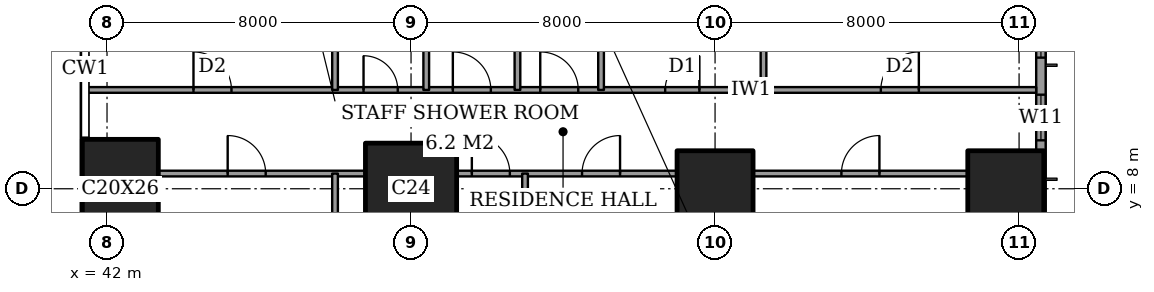
"""IFC4 building model, lengths in metres.
Left out: names, types, materials, properties, quantities, classifications, styles, units other than length and angle.
Written with IfcOpenShell. Run it as: python <this file> out.ifc"""

import sys

from ifc_helpers import new_model, si_unit, direction, frame, frame_2d, origin, origin_2d, place, context, subcontext, project, spatial, rectangle, extrude, element, fill, save


model = new_model("IFC4")
c1 = context("Model", 3, precision=1e-05, world=origin(), true_north=direction((0.0, 1.0)))
c2 = subcontext(c1, "Body", "Model", "MODEL_VIEW")
j1 = project(units=[si_unit("LENGTHUNIT", "METRE"), si_unit("PLANEANGLEUNIT", "RADIAN")], contexts=[c1])
p1 = place(None, origin())
s1 = spatial("IfcSite", under=j1, at=p1, CompositionType="ELEMENT")
p2 = place(p1, origin())
s2 = spatial("IfcBuilding", under=s1, at=p2, CompositionType="ELEMENT")
p3 = place(p2, frame((0.0, 0.0, 139.4)))
s3 = spatial("IfcBuildingStorey", under=s2, at=p3, CompositionType="ELEMENT", Elevation=139.4)
p4 = place(p3, frame((42.35, 8.0, 0.0), z_axis=(0.0, 0.0, 1.0), x_axis=(1.0, 0.0, 0.0)))
e1 = element("IfcColumn", 1, at=p4, inside=s3, PredefinedType="COLUMN", context=c2, shape_type="SweptSolid", body=[
    extrude(rectangle(XDim=2.0, YDim=2.6, at=origin_2d()), origin(), (0.0, 0.0, 1.0), 3.6),
])
p5 = place(p3, frame((50.0, 8.0, 0.0), z_axis=(0.0, 0.0, 1.0), x_axis=(1.0, 0.0, 0.0)))
e2 = element("IfcColumn", 2, at=p5, inside=s3, PredefinedType="COLUMN", context=c2, shape_type="SweptSolid", body=[
    extrude(rectangle(XDim=2.4, YDim=2.4, at=origin_2d()), origin(), (0.0, 0.0, 1.0), 3.6),
])
for number, where, z_axis, x_axis in (
    (3, (58.0, 8.0, 0.0), (0.0, 0.0, 1.0), (1.0, 0.0, 0.0)),
    (4, (65.65, 8.0, 0.0), (0.0, 0.0, 1.0), (1.0, 0.0, 0.0)),
):
    element("IfcColumn", number, at=place(p3, frame(where, z_axis=z_axis, x_axis=x_axis)), inside=s3, PredefinedType="COLUMN", context=c2, shape_type="SweptSolid", body=[
        extrude(rectangle(XDim=2.0, YDim=2.0, at=origin_2d()), origin(), (0.0, 0.0, 1.0), 3.6),
    ])
p6 = place(p3, frame((66.575, 3.175, 0.0), z_axis=(0.0, 0.0, 1.0), x_axis=(0.0, 1.0, 0.0)))
e5 = element("IfcWall", 5, at=p6, inside=s3, PredefinedType="SOLIDWALL", context=c2, shape_type="SweptSolid", body=[
    extrude(rectangle(XDim=41.65, YDim=0.25, at=frame_2d((20.825, 0.0))), origin(), (0.0, 0.0, 1.0), 3.6),
])
p7 = place(p6, frame((0.775, 0.0, 0.4)))
e6 = element("IfcOpeningElement", 6, at=p7, cuts=e5, PredefinedType="OPENING", context=c2, shape_type="SweptSolid", body=[
    extrude(rectangle(XDim=2.4, YDim=2.2, at=frame_2d((1.2, 1.1))), frame((0.0, 0.135, 0.0), z_axis=(0.0, -1.0, 0.0), x_axis=(1.0, 0.0, 0.0)), (0.0, 0.0, 1.0), 0.27),
])
p8 = place(p6, frame((6.1, 0.0, 0.4)))
e7 = element("IfcOpeningElement", 7, at=p8, cuts=e5, PredefinedType="OPENING", context=c2, shape_type="SweptSolid", body=[
    extrude(rectangle(XDim=1.2, YDim=2.2, at=frame_2d((0.6, 1.1))), frame((0.0, 0.135, 0.0), z_axis=(0.0, -1.0, 0.0), x_axis=(1.0, 0.0, 0.0)), (0.0, 0.0, 1.0), 0.27),
])
p9 = place(p6, frame((8.275, 0.0, 0.4)))
e8 = element("IfcOpeningElement", 8, at=p9, cuts=e5, PredefinedType="OPENING", context=c2, shape_type="SweptSolid", body=[
    extrude(rectangle(XDim=2.4, YDim=2.2, at=frame_2d((1.2, 1.1))), frame((0.0, 0.135, 0.0), z_axis=(0.0, -1.0, 0.0), x_axis=(1.0, 0.0, 0.0)), (0.0, 0.0, 1.0), 0.27),
])
p10 = place(p6, frame((15.775, 0.0, 0.4)))
e9 = element("IfcOpeningElement", 9, at=p10, cuts=e5, PredefinedType="OPENING", context=c2, shape_type="SweptSolid", body=[
    extrude(rectangle(XDim=2.4, YDim=2.2, at=frame_2d((1.2, 1.1))), frame((0.0, 0.135, 0.0), z_axis=(0.0, -1.0, 0.0), x_axis=(1.0, 0.0, 0.0)), (0.0, 0.0, 1.0), 0.27),
])
p11 = place(p6, frame((23.475, 0.0, 0.4)))
e10 = element("IfcOpeningElement", 10, at=p11, cuts=e5, PredefinedType="OPENING", context=c2, shape_type="SweptSolid", body=[
    extrude(rectangle(XDim=2.4, YDim=2.2, at=frame_2d((1.2, 1.1))), frame((0.0, 0.135, 0.0), z_axis=(0.0, -1.0, 0.0), x_axis=(1.0, 0.0, 0.0)), (0.0, 0.0, 1.0), 0.27),
])
p12 = place(p6, frame((30.975, 0.0, 0.4)))
e11 = element("IfcOpeningElement", 11, at=p12, cuts=e5, PredefinedType="OPENING", context=c2, shape_type="SweptSolid", body=[
    extrude(rectangle(XDim=2.4, YDim=2.2, at=frame_2d((1.2, 1.1))), frame((0.0, 0.135, 0.0), z_axis=(0.0, -1.0, 0.0), x_axis=(1.0, 0.0, 0.0)), (0.0, 0.0, 1.0), 0.27),
])
p13 = place(p6, frame((34.5, 0.0, 0.4)))
e12 = element("IfcOpeningElement", 12, at=p13, cuts=e5, PredefinedType="OPENING", context=c2, shape_type="SweptSolid", body=[
    extrude(rectangle(XDim=1.2, YDim=2.2, at=frame_2d((0.6, 1.1))), frame((0.0, 0.135, 0.0), z_axis=(0.0, -1.0, 0.0), x_axis=(1.0, 0.0, 0.0)), (0.0, 0.0, 1.0), 0.27),
])
p14 = place(p6, frame((38.475, 0.0, 0.4)))
e13 = element("IfcOpeningElement", 13, at=p14, cuts=e5, PredefinedType="OPENING", context=c2, shape_type="SweptSolid", body=[
    extrude(rectangle(XDim=2.4, YDim=2.2, at=frame_2d((1.2, 1.1))), frame((0.0, 0.135, 0.0), z_axis=(0.0, -1.0, 0.0), x_axis=(1.0, 0.0, 0.0)), (0.0, 0.0, 1.0), 0.27),
])
p15 = place(p3, frame((43.35, 8.4, 0.0), z_axis=(0.0, 0.0, 1.0), x_axis=(1.0, 0.0, 0.0)))
e14 = element("IfcWall", 14, at=p15, inside=s3, PredefinedType="PARTITIONING", context=c2, shape_type="SweptSolid", body=[
    extrude(rectangle(XDim=5.45, YDim=0.15, at=frame_2d((2.725, 0.0))), origin(), (0.0, 0.0, 1.0), 3.35),
])
p16 = place(p15, frame((1.825, 0.0, 0.0)))
e15 = element("IfcOpeningElement", 15, at=p16, cuts=e14, PredefinedType="OPENING", context=c2, shape_type="SweptSolid", body=[
    extrude(rectangle(XDim=1.0, YDim=2.1, at=frame_2d((0.5, 1.05))), frame((0.0, 0.085, 0.0), z_axis=(0.0, -1.0, 0.0), x_axis=(1.0, 0.0, 0.0)), (0.0, 0.0, 1.0), 0.17),
])
p17 = place(p3, frame((51.2, 8.4, 0.0), z_axis=(0.0, 0.0, 1.0), x_axis=(1.0, 0.0, 0.0)))
e16 = element("IfcWall", 16, at=p17, inside=s3, PredefinedType="PARTITIONING", context=c2, shape_type="SweptSolid", body=[
    extrude(rectangle(XDim=5.8, YDim=0.15, at=frame_2d((2.9, 0.0))), origin(), (0.0, 0.0, 1.0), 3.35),
])
p18 = place(p17, frame((3.3, 0.0, 0.0)))
e17 = element("IfcOpeningElement", 17, at=p18, cuts=e16, PredefinedType="OPENING", context=c2, shape_type="SweptSolid", body=[
    extrude(rectangle(XDim=1.0, YDim=2.1, at=frame_2d((0.5, 1.05))), frame((0.0, 0.085, 0.0), z_axis=(0.0, -1.0, 0.0), x_axis=(1.0, 0.0, 0.0)), (0.0, 0.0, 1.0), 0.17),
])
p19 = place(p17, frame((0.4, 0.0, 0.0)))
e18 = element("IfcOpeningElement", 18, at=p19, cuts=e16, PredefinedType="OPENING", context=c2, shape_type="SweptSolid", body=[
    extrude(rectangle(XDim=1.0, YDim=2.1, at=frame_2d((0.5, 1.05))), frame((0.0, 0.085, 0.0), z_axis=(0.0, -1.0, 0.0), x_axis=(1.0, 0.0, 0.0)), (0.0, 0.0, 1.0), 0.17),
])
p20 = place(p3, frame((59.0, 8.4, 0.0), z_axis=(0.0, 0.0, 1.0), x_axis=(1.0, 0.0, 0.0)))
e19 = element("IfcWall", 19, at=p20, inside=s3, PredefinedType="PARTITIONING", context=c2, shape_type="SweptSolid", body=[
    extrude(rectangle(XDim=5.65, YDim=0.15, at=frame_2d((2.825, 0.0))), origin(), (0.0, 0.0, 1.0), 3.35),
])
p21 = place(p20, frame((2.325, 0.0, 0.0)))
e20 = element("IfcOpeningElement", 20, at=p21, cuts=e19, PredefinedType="OPENING", context=c2, shape_type="SweptSolid", body=[
    extrude(rectangle(XDim=1.0, YDim=2.1, at=frame_2d((0.5, 1.05))), frame((0.0, 0.085, 0.0), z_axis=(0.0, -1.0, 0.0), x_axis=(1.0, 0.0, 0.0)), (0.0, 0.0, 1.0), 0.17),
])
p22 = place(p3, frame((41.439, 10.6, 0.0), z_axis=(0.0, 0.0, 1.0), x_axis=(1.0, 0.0, 0.0)))
e21 = element("IfcWall", 21, at=p22, inside=s3, PredefinedType="PARTITIONING", context=c2, shape_type="SweptSolid", body=[
    extrude(rectangle(XDim=25.011, YDim=0.15, at=frame_2d((12.505, 0.0))), origin(), (0.0, 0.0, 1.0), 3.35),
])
p23 = place(p22, frame((11.961, 0.0, 0.0)))
e22 = element("IfcOpeningElement", 22, at=p23, cuts=e21, PredefinedType="OPENING", context=c2, shape_type="SweptSolid", body=[
    extrude(rectangle(XDim=1.0, YDim=2.1, at=frame_2d((0.5, 1.05))), frame((0.0, 0.085, 0.0), z_axis=(0.0, -1.0, 0.0), x_axis=(1.0, 0.0, 0.0)), (0.0, 0.0, 1.0), 0.17),
])
p24 = place(p22, frame((20.924, 0.0, 0.0)))
e23 = element("IfcOpeningElement", 23, at=p24, cuts=e21, PredefinedType="OPENING", context=c2, shape_type="SweptSolid", body=[
    extrude(rectangle(XDim=1.0, YDim=2.1, at=frame_2d((0.5, 1.05))), frame((0.0, 0.085, 0.0), z_axis=(0.0, -1.0, 0.0), x_axis=(1.0, 0.0, 0.0)), (0.0, 0.0, 1.0), 0.17),
])
p25 = place(p22, frame((15.249, 0.0, 0.0)))
e24 = element("IfcOpeningElement", 24, at=p25, cuts=e21, PredefinedType="OPENING", context=c2, shape_type="SweptSolid", body=[
    extrude(rectangle(XDim=0.9, YDim=2.1, at=frame_2d((0.45, 1.05))), frame((0.0, 0.085, 0.0), z_axis=(0.0, -1.0, 0.0), x_axis=(1.0, 0.0, 0.0)), (0.0, 0.0, 1.0), 0.17),
])
p26 = place(p22, frame((9.661, 0.0, 0.0)))
e25 = element("IfcOpeningElement", 25, at=p26, cuts=e21, PredefinedType="OPENING", context=c2, shape_type="SweptSolid", body=[
    extrude(rectangle(XDim=1.0, YDim=2.1, at=frame_2d((0.5, 1.05))), frame((0.0, 0.085, 0.0), z_axis=(0.0, -1.0, 0.0), x_axis=(1.0, 0.0, 0.0)), (0.0, 0.0, 1.0), 0.17),
])
p27 = place(p22, frame((7.311, 0.0, 0.0)))
e26 = element("IfcOpeningElement", 26, at=p27, cuts=e21, PredefinedType="OPENING", context=c2, shape_type="SweptSolid", body=[
    extrude(rectangle(XDim=0.9, YDim=2.1, at=frame_2d((0.45, 1.05))), frame((0.0, 0.085, 0.0), z_axis=(0.0, -1.0, 0.0), x_axis=(1.0, 0.0, 0.0)), (0.0, 0.0, 1.0), 0.17),
])
p28 = place(p22, frame((2.836, 0.0, 0.0)))
e27 = element("IfcOpeningElement", 27, at=p28, cuts=e21, PredefinedType="OPENING", context=c2, shape_type="SweptSolid", body=[
    extrude(rectangle(XDim=1.0, YDim=2.1, at=frame_2d((0.5, 1.05))), frame((0.0, 0.085, 0.0), z_axis=(0.0, -1.0, 0.0), x_axis=(1.0, 0.0, 0.0)), (0.0, 0.0, 1.0), 0.17),
])
p29 = place(p3, frame((48.0, -0.45, 0.0), z_axis=(0.0, 0.0, 1.0), x_axis=(0.0, 1.0, 0.0)))
e28 = element("IfcWall", 28, at=p29, inside=s3, PredefinedType="PARTITIONING", context=c2, shape_type="SweptSolid", body=[
    extrude(rectangle(XDim=8.85, YDim=0.15, at=frame_2d((4.425, 0.0))), origin(), (0.0, 0.0, 1.0), 3.35),
])
p30 = place(p3, frame((48.0, 10.6, 0.0), z_axis=(0.0, 0.0, 1.0), x_axis=(0.0, 1.0, 0.0)))
e29 = element("IfcWall", 29, at=p30, inside=s3, PredefinedType="PARTITIONING", context=c2, shape_type="SweptSolid", body=[
    extrude(rectangle(XDim=8.4, YDim=0.15, at=frame_2d((4.2, 0.0))), origin(), (0.0, 0.0, 1.0), 3.35),
])
p31 = place(p30, frame((6.7, 0.0, 0.0)))
e30 = element("IfcOpeningElement", 30, at=p31, cuts=e29, PredefinedType="OPENING", context=c2, shape_type="SweptSolid", body=[
    extrude(rectangle(XDim=0.9, YDim=2.1, at=frame_2d((0.45, 1.05))), frame((0.0, 0.085, 0.0), z_axis=(0.0, -1.0, 0.0), x_axis=(1.0, 0.0, 0.0)), (0.0, 0.0, 1.0), 0.17),
])
p32 = place(p3, frame((50.4, 10.6, 0.0), z_axis=(0.0, 0.0, 1.0), x_axis=(0.0, 1.0, 0.0)))
e31 = element("IfcWall", 31, at=p32, inside=s3, PredefinedType="PARTITIONING", context=c2, shape_type="SweptSolid", body=[
    extrude(rectangle(XDim=4.2, YDim=0.15, at=frame_2d((2.1, 0.0))), origin(), (0.0, 0.0, 1.0), 3.35),
])
p33 = place(p3, frame((52.8, 10.6, 0.0), z_axis=(0.0, 0.0, 1.0), x_axis=(0.0, 1.0, 0.0)))
e32 = element("IfcWall", 32, at=p33, inside=s3, PredefinedType="PARTITIONING", context=c2, shape_type="SweptSolid", body=[
    extrude(rectangle(XDim=8.4, YDim=0.15, at=frame_2d((4.2, 0.0))), origin(), (0.0, 0.0, 1.0), 3.35),
])
p34 = place(p3, frame((53.0, -0.45, 0.0), z_axis=(0.0, 0.0, 1.0), x_axis=(0.0, 1.0, 0.0)))
e33 = element("IfcWall", 33, at=p34, inside=s3, PredefinedType="PARTITIONING", context=c2, shape_type="SweptSolid", body=[
    extrude(rectangle(XDim=8.85, YDim=0.15, at=frame_2d((4.425, 0.0))), origin(), (0.0, 0.0, 1.0), 3.35),
])
p35 = place(p3, frame((55.0, 10.6, 0.0), z_axis=(0.0, 0.0, 1.0), x_axis=(0.0, 1.0, 0.0)))
e34 = element("IfcWall", 34, at=p35, inside=s3, PredefinedType="PARTITIONING", context=c2, shape_type="SweptSolid", body=[
    extrude(rectangle(XDim=11.0, YDim=0.15, at=frame_2d((5.5, 0.0))), origin(), (0.0, 0.0, 1.0), 3.35),
])
p36 = place(p35, frame((9.2, 0.0, 0.0)))
e35 = element("IfcOpeningElement", 35, at=p36, cuts=e34, PredefinedType="OPENING", context=c2, shape_type="SweptSolid", body=[
    extrude(rectangle(XDim=1.0, YDim=2.1, at=frame_2d((0.5, 1.05))), frame((0.0, 0.085, 0.0), z_axis=(0.0, -1.0, 0.0), x_axis=(1.0, 0.0, 0.0)), (0.0, 0.0, 1.0), 0.17),
])
p37 = place(p3, frame((59.275, 10.6, 0.0), z_axis=(0.0, 0.0, 1.0), x_axis=(0.0, 1.0, 0.0)))
e36 = element("IfcWall", 36, at=p37, inside=s3, PredefinedType="PARTITIONING", context=c2, shape_type="SweptSolid", body=[
    extrude(rectangle(XDim=4.2, YDim=0.15, at=frame_2d((2.1, 0.0))), origin(), (0.0, 0.0, 1.0), 3.35),
])
p38 = place(p8, origin())
e37 = element("IfcWindow", 37, at=p38, inside=s3, PartitioningType="SINGLE_PANEL", PredefinedType="WINDOW", context=c2, shape_type="SweptSolid", body=[
    extrude(rectangle(XDim=1.2, YDim=2.2, at=frame_2d((0.6, 1.1))), frame((0.0, 0.03, 0.0), z_axis=(0.0, -1.0, 0.0), x_axis=(1.0, 0.0, 0.0)), (0.0, 0.0, 1.0), 0.06),
])
fill(e7, e37)
p39 = place(p9, origin())
e38 = element("IfcWindow", 38, at=p39, inside=s3, PartitioningType="SINGLE_PANEL", PredefinedType="WINDOW", context=c2, shape_type="SweptSolid", body=[
    extrude(rectangle(XDim=2.4, YDim=2.2, at=frame_2d((1.2, 1.1))), frame((0.0, 0.03, 0.0), z_axis=(0.0, -1.0, 0.0), x_axis=(1.0, 0.0, 0.0)), (0.0, 0.0, 1.0), 0.06),
])
fill(e8, e38)
p40 = place(p21, origin())
e39 = element("IfcDoor", 39, at=p40, inside=s3, OperationType="SINGLE_SWING_LEFT", PredefinedType="DOOR", context=c2, shape_type="SweptSolid", body=[
    extrude(rectangle(XDim=1.0, YDim=2.1, at=frame_2d((0.5, 1.05))), frame((0.0, 0.025, 0.0), z_axis=(0.0, -1.0, 0.0), x_axis=(1.0, 0.0, 0.0)), (0.0, 0.0, 1.0), 0.05),
])
fill(e20, e39)
p41 = place(p18, origin())
e40 = element("IfcDoor", 40, at=p41, inside=s3, OperationType="SINGLE_SWING_LEFT", PredefinedType="DOOR", context=c2, shape_type="SweptSolid", body=[
    extrude(rectangle(XDim=1.0, YDim=2.1, at=frame_2d((0.5, 1.05))), frame((0.0, 0.025, 0.0), z_axis=(0.0, -1.0, 0.0), x_axis=(1.0, 0.0, 0.0)), (0.0, 0.0, 1.0), 0.05),
])
fill(e17, e40)
p42 = place(p19, origin())
e41 = element("IfcDoor", 41, at=p42, inside=s3, OperationType="SINGLE_SWING_RIGHT", PredefinedType="DOOR", context=c2, shape_type="SweptSolid", body=[
    extrude(rectangle(XDim=1.0, YDim=2.1, at=frame_2d((0.5, 1.05))), frame((0.0, 0.025, 0.0), z_axis=(0.0, -1.0, 0.0), x_axis=(1.0, 0.0, 0.0)), (0.0, 0.0, 1.0), 0.05),
])
fill(e18, e41)
p43 = place(p16, origin())
e42 = element("IfcDoor", 42, at=p43, inside=s3, OperationType="SINGLE_SWING_RIGHT", PredefinedType="DOOR", context=c2, shape_type="SweptSolid", body=[
    extrude(rectangle(XDim=1.0, YDim=2.1, at=frame_2d((0.5, 1.05))), frame((0.0, 0.025, 0.0), z_axis=(0.0, -1.0, 0.0), x_axis=(1.0, 0.0, 0.0)), (0.0, 0.0, 1.0), 0.05),
])
fill(e15, e42)
p44 = place(p23, origin())
e43 = element("IfcDoor", 43, at=p44, inside=s3, OperationType="SINGLE_SWING_RIGHT", PredefinedType="DOOR", context=c2, shape_type="SweptSolid", body=[
    extrude(rectangle(XDim=1.0, YDim=2.1, at=frame_2d((0.5, 1.05))), frame((0.0, 0.025, 0.0), z_axis=(0.0, -1.0, 0.0), x_axis=(1.0, 0.0, 0.0)), (0.0, 0.0, 1.0), 0.05),
])
fill(e22, e43)
p45 = place(p24, origin())
e44 = element("IfcDoor", 44, at=p45, inside=s3, OperationType="SINGLE_SWING_LEFT", PredefinedType="DOOR", context=c2, shape_type="SweptSolid", body=[
    extrude(rectangle(XDim=1.0, YDim=2.1, at=frame_2d((0.5, 1.05))), frame((0.0, 0.025, 0.0), z_axis=(0.0, -1.0, 0.0), x_axis=(1.0, 0.0, 0.0)), (0.0, 0.0, 1.0), 0.05),
])
fill(e23, e44)
p46 = place(p25, origin())
e45 = element("IfcDoor", 45, at=p46, inside=s3, OperationType="SINGLE_SWING_LEFT", PredefinedType="DOOR", context=c2, shape_type="SweptSolid", body=[
    extrude(rectangle(XDim=0.9, YDim=2.1, at=frame_2d((0.45, 1.05))), frame((0.0, 0.025, 0.0), z_axis=(0.0, -1.0, 0.0), x_axis=(1.0, 0.0, 0.0)), (0.0, 0.0, 1.0), 0.05),
])
fill(e24, e45)
p47 = place(p26, origin())
e46 = element("IfcDoor", 46, at=p47, inside=s3, OperationType="SINGLE_SWING_RIGHT", PredefinedType="DOOR", context=c2, shape_type="SweptSolid", body=[
    extrude(rectangle(XDim=1.0, YDim=2.1, at=frame_2d((0.5, 1.05))), frame((0.0, 0.025, 0.0), z_axis=(0.0, -1.0, 0.0), x_axis=(1.0, 0.0, 0.0)), (0.0, 0.0, 1.0), 0.05),
])
fill(e25, e46)
p48 = place(p27, origin())
e47 = element("IfcDoor", 47, at=p48, inside=s3, OperationType="SINGLE_SWING_RIGHT", PredefinedType="DOOR", context=c2, shape_type="SweptSolid", body=[
    extrude(rectangle(XDim=0.9, YDim=2.1, at=frame_2d((0.45, 1.05))), frame((0.0, 0.025, 0.0), z_axis=(0.0, -1.0, 0.0), x_axis=(1.0, 0.0, 0.0)), (0.0, 0.0, 1.0), 0.05),
])
fill(e26, e47)
p49 = place(p28, origin())
e48 = element("IfcDoor", 48, at=p49, inside=s3, OperationType="SINGLE_SWING_RIGHT", PredefinedType="DOOR", context=c2, shape_type="SweptSolid", body=[
    extrude(rectangle(XDim=1.0, YDim=2.1, at=frame_2d((0.5, 1.05))), frame((0.0, 0.025, 0.0), z_axis=(0.0, -1.0, 0.0), x_axis=(1.0, 0.0, 0.0)), (0.0, 0.0, 1.0), 0.05),
])
fill(e27, e48)
save(model, sys.argv[1])
